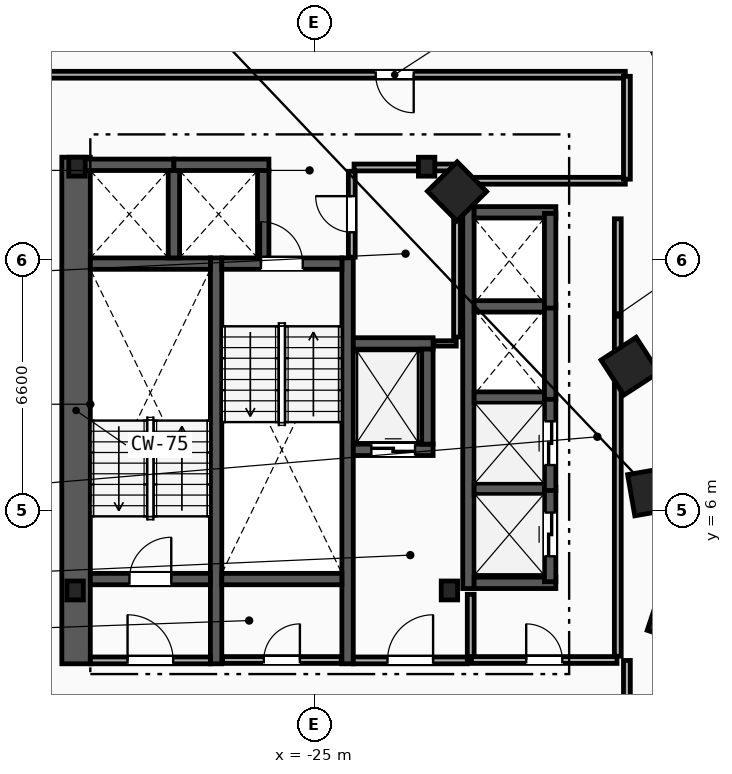
"""IFC4 building model, lengths in metres.
Left out: names, types, materials, properties, quantities, classifications, styles, units other than length and angle.
Written with IfcOpenShell. Run it as: python <this file> out.ifc"""

import sys

from ifc_helpers import new_model, si_unit, direction, frame, frame_2d, origin, origin_2d, place, context, subcontext, project, spatial, rectangle, i_section, extrude, element, fill, save


model = new_model("IFC4")
c1 = context("Model", 3, precision=1e-05, world=origin(), true_north=direction((0.0, 1.0)))
c2 = subcontext(c1, "Body", "Model", "MODEL_VIEW")
j1 = project(units=[si_unit("LENGTHUNIT", "METRE"), si_unit("PLANEANGLEUNIT", "RADIAN")], contexts=[c1])
p1 = place(None, origin())
s1 = spatial("IfcSite", under=j1, at=p1, CompositionType="ELEMENT")
p2 = place(p1, origin())
s2 = spatial("IfcBuilding", under=s1, at=p2, CompositionType="ELEMENT")
p3 = place(p2, frame((0.0, 0.0, 110.6)))
s3 = spatial("IfcBuildingStorey", under=s2, at=p3, CompositionType="ELEMENT", Elevation=110.6)
for number, where, z_axis, x_axis in (
    (1, (-31.3, 3.9, 0.0), (0.0, 0.0, 1.0), (1.0, 0.0, 0.0)),
    (2, (-21.45, 3.9, 0.0), (0.0, 0.0, 1.0), (1.0, 0.0, 0.0)),
    (3, (-22.05, 15.05, 0.0), (0.0, 0.0, 1.0), (1.0, 0.0, 0.0)),
    (4, (-31.25, 15.05, 0.0), (0.0, 0.0, 1.0), (1.0, 0.0, 0.0)),
):
    element("IfcColumn", number, at=place(p3, frame(where, z_axis=z_axis, x_axis=x_axis)), inside=s3, PredefinedType="COLUMN", context=c2, shape_type="SweptSolid", body=[
        extrude(i_section(OverallWidth=0.432, OverallDepth=0.498, WebThickness=0.056, FlangeThickness=0.089, FilletRadius=0.018, at=origin_2d()), origin(), (0.0, 0.0, 1.0), 3.6),
    ])
for number, where, z_axis, x_axis in (
    (5, (-15.55, 3.2, 0.0), (0.0, 0.0, 1.0), (0.315, 0.949, 0.0)),
    (6, (-16.125, 6.5, 0.0), (0.0, 0.0, 1.0), (-0.172, 0.985, 0.0)),
    (7, (-16.7, 9.8, 0.0), (0.0, 0.0, 1.0), (-0.544, 0.839, 0.0)),
    (8, (-21.25, 14.4, 0.0), (0.0, 0.0, 1.0), (-0.703, 0.711, 0.0)),
):
    element("IfcColumn", number, at=place(p3, frame(where, z_axis=z_axis, x_axis=x_axis)), inside=s3, PredefinedType="COLUMN", context=c2, shape_type="SweptSolid", body=[
        extrude(rectangle(XDim=1.1, YDim=1.1, at=origin_2d()), origin(), (0.0, 0.0, 1.0), 3.6),
    ])
p4 = place(p3, frame((-31.275, 1.97, 0.0), z_axis=(0.0, 0.0, 1.0), x_axis=(0.0, 1.0, 0.0)))
e9 = element("IfcWall", 9, at=p4, inside=s3, PredefinedType="SHEAR", context=c2, shape_type="SweptSolid", body=[
    extrude(rectangle(XDim=13.33, YDim=0.75, at=frame_2d((6.665, 0.0))), origin(), (0.0, 0.0, 1.0), 3.3),
])
for number, where, z_axis, x_axis in (
    (10, (-27.59, 1.97, 0.0), (0.0, 0.0, 1.0), (0.0, 1.0, 0.0)),
    (11, (-24.13, 1.97, 0.0), (0.0, 0.0, 1.0), (0.0, 1.0, 0.0)),
):
    element("IfcWall", number, at=place(p3, frame(where, z_axis=z_axis, x_axis=x_axis)), inside=s3, PredefinedType="SHEAR", context=c2, shape_type="SweptSolid", body=[
        extrude(rectangle(XDim=10.68, YDim=0.3, at=frame_2d((5.34, 0.0))), origin(), (0.0, 0.0, 1.0), 3.3),
    ])
p5 = place(p3, frame((-30.9, 4.2, 0.0), z_axis=(0.0, 0.0, 1.0), x_axis=(1.0, 0.0, 0.0)))
e12 = element("IfcWall", 12, at=p5, inside=s3, PredefinedType="SHEAR", context=c2, shape_type="SweptSolid", body=[
    extrude(rectangle(XDim=3.16, YDim=0.3, at=frame_2d((1.58, 0.0))), origin(), (0.0, 0.0, 1.0), 3.3),
])
p6 = place(p5, frame((1.03, 0.0, 0.0)))
e13 = element("IfcOpeningElement", 13, at=p6, cuts=e12, PredefinedType="OPENING", context=c2, shape_type="SweptSolid", body=[
    extrude(rectangle(XDim=1.1, YDim=2.15, at=frame_2d((0.55, 1.075))), frame((0.0, 0.16, 0.0), z_axis=(0.0, -1.0, 0.0), x_axis=(1.0, 0.0, 0.0)), (0.0, 0.0, 1.0), 0.32),
])
p7 = place(p3, frame((-30.9, 12.5, 0.0), z_axis=(0.0, 0.0, 1.0), x_axis=(1.0, 0.0, 0.0)))
e14 = element("IfcWall", 14, at=p7, inside=s3, PredefinedType="SHEAR", context=c2, shape_type="SweptSolid", body=[
    extrude(rectangle(XDim=3.16, YDim=0.3, at=frame_2d((1.58, 0.0))), origin(), (0.0, 0.0, 1.0), 3.3),
])
p8 = place(p3, frame((-27.44, 12.5, 0.0), z_axis=(0.0, 0.0, 1.0), x_axis=(1.0, 0.0, 0.0)))
e15 = element("IfcWall", 15, at=p8, inside=s3, PredefinedType="SHEAR", context=c2, shape_type="SweptSolid", body=[
    extrude(rectangle(XDim=3.16, YDim=0.3, at=frame_2d((1.58, 0.0))), origin(), (0.0, 0.0, 1.0), 3.3),
])
p9 = place(p8, frame((1.03, 0.0, 0.0)))
e16 = element("IfcOpeningElement", 16, at=p9, cuts=e15, PredefinedType="OPENING", context=c2, shape_type="SweptSolid", body=[
    extrude(rectangle(XDim=1.1, YDim=2.15, at=frame_2d((0.55, 1.075))), frame((0.0, 0.16, 0.0), z_axis=(0.0, -1.0, 0.0), x_axis=(1.0, 0.0, 0.0)), (0.0, 0.0, 1.0), 0.32),
])
p10 = place(p3, frame((-27.44, 4.2, 0.0), z_axis=(0.0, 0.0, 1.0), x_axis=(1.0, 0.0, 0.0)))
e17 = element("IfcWall", 17, at=p10, inside=s3, PredefinedType="SHEAR", context=c2, shape_type="SweptSolid", body=[
    extrude(rectangle(XDim=3.16, YDim=0.3, at=frame_2d((1.58, 0.0))), origin(), (0.0, 0.0, 1.0), 3.3),
])
p11 = place(p3, frame((-20.89, 2.15, 0.0), z_axis=(0.0, 0.0, 1.0), x_axis=(0.0, 1.0, 0.0)))
e18 = element("IfcWall", 18, at=p11, inside=s3, PredefinedType="PARTITIONING", context=c2, shape_type="SweptSolid", body=[
    extrude(rectangle(XDim=1.65, YDim=0.18, at=frame_2d((0.825, 0.0))), origin(), (0.0, 0.0, 1.0), 3.3),
])
p12 = place(p3, frame((-23.98, 2.06, 0.0), z_axis=(0.0, 0.0, 1.0), x_axis=(1.0, 0.0, 0.0)))
e19 = element("IfcWall", 19, at=p12, inside=s3, PredefinedType="PARTITIONING", context=c2, shape_type="SweptSolid", body=[
    extrude(rectangle(XDim=3.0, YDim=0.18, at=frame_2d((1.5, 0.0))), origin(), (0.0, 0.0, 1.0), 3.3),
])
p13 = place(p12, frame((0.9, 0.0, 0.0)))
e20 = element("IfcOpeningElement", 20, at=p13, cuts=e19, PredefinedType="OPENING", context=c2, shape_type="SweptSolid", body=[
    extrude(rectangle(XDim=1.2, YDim=2.15, at=frame_2d((0.6, 1.075))), frame((0.0, 0.1, 0.0), z_axis=(0.0, -1.0, 0.0), x_axis=(1.0, 0.0, 0.0)), (0.0, 0.0, 1.0), 0.2),
])
p14 = place(p3, frame((-30.9, 2.06, 0.0), z_axis=(0.0, 0.0, 1.0), x_axis=(1.0, 0.0, 0.0)))
e21 = element("IfcWall", 21, at=p14, inside=s3, PredefinedType="PARTITIONING", context=c2, shape_type="SweptSolid", body=[
    extrude(rectangle(XDim=3.16, YDim=0.18, at=frame_2d((1.58, 0.0))), origin(), (0.0, 0.0, 1.0), 3.3),
])
p15 = place(p14, frame((0.98, 0.0, 0.0)))
e22 = element("IfcOpeningElement", 22, at=p15, cuts=e21, PredefinedType="OPENING", context=c2, shape_type="SweptSolid", body=[
    extrude(rectangle(XDim=1.2, YDim=2.15, at=frame_2d((0.6, 1.075))), frame((0.0, 0.1, 0.0), z_axis=(0.0, -1.0, 0.0), x_axis=(1.0, 0.0, 0.0)), (0.0, 0.0, 1.0), 0.2),
])
p16 = place(p3, frame((-23.98, 7.6, 0.0), z_axis=(0.0, 0.0, 1.0), x_axis=(1.0, 0.0, 0.0)))
e23 = element("IfcWall", 23, at=p16, inside=s3, PredefinedType="SHEAR", context=c2, shape_type="SweptSolid", body=[
    extrude(rectangle(XDim=2.1, YDim=0.3, at=frame_2d((1.05, 0.0))), origin(), (0.0, 0.0, 1.0), 3.3),
])
p17 = place(p16, frame((0.475, 0.0, 0.0)))
e24 = element("IfcOpeningElement", 24, at=p17, cuts=e23, PredefinedType="OPENING", context=c2, shape_type="SweptSolid", body=[
    extrude(rectangle(XDim=1.15, YDim=2.2, at=frame_2d((0.575, 1.1))), frame((0.0, 0.16, 0.0), z_axis=(0.0, -1.0, 0.0), x_axis=(1.0, 0.0, 0.0)), (0.0, 0.0, 1.0), 0.32),
])
p18 = place(p3, frame((-23.98, 10.4, 0.0), z_axis=(0.0, 0.0, 1.0), x_axis=(1.0, 0.0, 0.0)))
e25 = element("IfcWall", 25, at=p18, inside=s3, PredefinedType="SHEAR", context=c2, shape_type="SweptSolid", body=[
    extrude(rectangle(XDim=2.1, YDim=0.3, at=frame_2d((1.05, 0.0))), origin(), (0.0, 0.0, 1.0), 3.3),
])
for number, where, z_axis, x_axis in (
    (26, (-22.03, 7.75, 0.0), (0.0, 0.0, 1.0), (0.0, 1.0, 0.0)),
    (27, (-31.2, 15.1, 0.0), (0.0, 0.0, 1.0), (1.0, 0.0, 0.0)),
):
    element("IfcWall", number, at=place(p3, frame(where, z_axis=z_axis, x_axis=x_axis)), inside=s3, PredefinedType="SHEAR", context=c2, shape_type="SweptSolid", body=[
        extrude(rectangle(XDim=2.5, YDim=0.3, at=frame_2d((1.25, 0.0))), origin(), (0.0, 0.0, 1.0), 3.3),
    ])
p19 = place(p3, frame((-28.7, 12.65, 0.0), z_axis=(0.0, 0.0, 1.0), x_axis=(0.0, 1.0, 0.0)))
e28 = element("IfcWall", 28, at=p19, inside=s3, PredefinedType="SHEAR", context=c2, shape_type="SweptSolid", body=[
    extrude(rectangle(XDim=2.3, YDim=0.3, at=frame_2d((1.15, 0.0))), origin(), (0.0, 0.0, 1.0), 3.3),
])
p20 = place(p3, frame((-28.7, 15.1, 0.0), z_axis=(0.0, 0.0, 1.0), x_axis=(1.0, 0.0, 0.0)))
e29 = element("IfcWall", 29, at=p20, inside=s3, PredefinedType="SHEAR", context=c2, shape_type="SweptSolid", body=[
    extrude(rectangle(XDim=2.5, YDim=0.3, at=frame_2d((1.25, 0.0))), origin(), (0.0, 0.0, 1.0), 3.3),
])
p21 = place(p3, frame((-26.35, 12.65, 0.0), z_axis=(0.0, 0.0, 1.0), x_axis=(0.0, 1.0, 0.0)))
e30 = element("IfcWall", 30, at=p21, inside=s3, PredefinedType="SHEAR", context=c2, shape_type="SweptSolid", body=[
    extrude(rectangle(XDim=2.3, YDim=0.3, at=frame_2d((1.15, 0.0))), origin(), (0.0, 0.0, 1.0), 3.3),
])
p22 = place(p3, frame((-20.95, 3.95, 0.0), z_axis=(0.0, 0.0, 1.0), x_axis=(0.0, 1.0, 0.0)))
e31 = element("IfcWall", 31, at=p22, inside=s3, PredefinedType="SHEAR", context=c2, shape_type="SweptSolid", body=[
    extrude(rectangle(XDim=10.05, YDim=0.3, at=frame_2d((5.025, 0.0))), origin(), (0.0, 0.0, 1.0), 3.3),
])
for number, where, z_axis, x_axis in (
    (32, (-20.8, 4.1, 0.0), (0.0, 0.0, 1.0), (1.0, 0.0, 0.0)),
    (33, (-20.8, 13.85, 0.0), (0.0, 0.0, 1.0), (1.0, 0.0, 0.0)),
):
    element("IfcWall", number, at=place(p3, frame(where, z_axis=z_axis, x_axis=x_axis)), inside=s3, PredefinedType="SHEAR", context=c2, shape_type="SweptSolid", body=[
        extrude(rectangle(XDim=2.15, YDim=0.3, at=frame_2d((1.075, 0.0))), origin(), (0.0, 0.0, 1.0), 3.3),
    ])
for number, where, z_axis, x_axis in (
    (34, (-20.8, 6.575, 0.0), (0.0, 0.0, 1.0), (1.0, 0.0, 0.0)),
    (35, (-20.8, 8.975, 0.0), (0.0, 0.0, 1.0), (1.0, 0.0, 0.0)),
    (36, (-20.8, 11.375, 0.0), (0.0, 0.0, 1.0), (1.0, 0.0, 0.0)),
):
    element("IfcWall", number, at=place(p3, frame(where, z_axis=z_axis, x_axis=x_axis)), inside=s3, PredefinedType="SHEAR", context=c2, shape_type="SweptSolid", body=[
        extrude(rectangle(XDim=1.85, YDim=0.3, at=frame_2d((0.925, 0.0))), origin(), (0.0, 0.0, 1.0), 3.3),
    ])
p23 = place(p3, frame((-18.8, 4.13, 0.0), z_axis=(0.0, 0.0, 1.0), x_axis=(0.0, 1.0, 0.0)))
e37 = element("IfcWall", 37, at=p23, inside=s3, PredefinedType="SHEAR", context=c2, shape_type="SweptSolid", body=[
    extrude(rectangle(XDim=2.49, YDim=0.3, at=frame_2d((1.245, 0.0))), origin(), (0.0, 0.0, 1.0), 3.3),
])
p24 = place(p23, frame((0.67, 0.0, 0.0)))
e38 = element("IfcOpeningElement", 38, at=p24, cuts=e37, PredefinedType="OPENING", context=c2, shape_type="SweptSolid", body=[
    extrude(rectangle(XDim=1.15, YDim=2.2, at=frame_2d((0.575, 1.1))), frame((0.0, 0.16, 0.0), z_axis=(0.0, -1.0, 0.0), x_axis=(1.0, 0.0, 0.0)), (0.0, 0.0, 1.0), 0.32),
])
p25 = place(p3, frame((-18.8, 6.53, 0.0), z_axis=(0.0, 0.0, 1.0), x_axis=(0.0, 1.0, 0.0)))
e39 = element("IfcWall", 39, at=p25, inside=s3, PredefinedType="SHEAR", context=c2, shape_type="SweptSolid", body=[
    extrude(rectangle(XDim=2.49, YDim=0.3, at=frame_2d((1.245, 0.0))), origin(), (0.0, 0.0, 1.0), 3.3),
])
p26 = place(p25, frame((0.67, 0.0, 0.0)))
e40 = element("IfcOpeningElement", 40, at=p26, cuts=e39, PredefinedType="OPENING", context=c2, shape_type="SweptSolid", body=[
    extrude(rectangle(XDim=1.15, YDim=2.2, at=frame_2d((0.575, 1.1))), frame((0.0, 0.16, 0.0), z_axis=(0.0, -1.0, 0.0), x_axis=(1.0, 0.0, 0.0)), (0.0, 0.0, 1.0), 0.32),
])
for number, where, z_axis, x_axis in (
    (41, (-18.8, 8.93, 0.0), (0.0, 0.0, 1.0), (0.0, 1.0, 0.0)),
    (42, (-18.8, 11.33, 0.0), (0.0, 0.0, 1.0), (0.0, 1.0, 0.0)),
):
    element("IfcWall", number, at=place(p3, frame(where, z_axis=z_axis, x_axis=x_axis)), inside=s3, PredefinedType="SHEAR", context=c2, shape_type="SweptSolid", body=[
        extrude(rectangle(XDim=2.49, YDim=0.3, at=frame_2d((1.245, 0.0))), origin(), (0.0, 0.0, 1.0), 3.3),
    ])
p27 = place(p3, frame((-17.02, 2.17, 0.0), z_axis=(0.0, 0.0, 1.0), x_axis=(0.0, 1.0, 0.0)))
e43 = element("IfcWall", 43, at=p27, inside=s3, PredefinedType="PARTITIONING", context=c2, shape_type="SweptSolid", body=[
    extrude(rectangle(XDim=11.51, YDim=0.18, at=frame_2d((5.755, 0.0))), origin(), (0.0, 0.0, 1.0), 3.3),
])
p28 = place(p3, frame((-20.87, 2.07, 0.0), z_axis=(0.0, 0.0, 1.0), x_axis=(1.0, 0.0, 0.0)))
e44 = element("IfcWall", 44, at=p28, inside=s3, PredefinedType="PARTITIONING", context=c2, shape_type="SweptSolid", body=[
    extrude(rectangle(XDim=3.83, YDim=0.18, at=frame_2d((1.915, 0.0))), origin(), (0.0, 0.0, 1.0), 3.3),
])
p29 = place(p28, frame((1.44, 0.0, 0.0)))
e45 = element("IfcOpeningElement", 45, at=p29, cuts=e44, PredefinedType="OPENING", context=c2, shape_type="SweptSolid", body=[
    extrude(rectangle(XDim=0.95, YDim=2.1, at=frame_2d((0.475, 1.05))), frame((0.0, 0.1, 0.0), z_axis=(0.0, -1.0, 0.0), x_axis=(1.0, 0.0, 0.0)), (0.0, 0.0, 1.0), 0.2),
])
p30 = place(p3, frame((-21.86, 10.4, 0.0), z_axis=(0.0, 0.0, 1.0), x_axis=(1.0, 0.0, 0.0)))
e46 = element("IfcWall", 46, at=p30, inside=s3, PredefinedType="PARTITIONING", context=c2, shape_type="SweptSolid", body=[
    extrude(rectangle(XDim=0.59, YDim=0.14, at=frame_2d((0.295, 0.0))), origin(), (0.0, 0.0, 1.0), 3.3),
])
p31 = place(p3, frame((-21.25, 10.57, 0.0), z_axis=(0.0, 0.0, 1.0), x_axis=(0.0, 1.0, 0.0)))
e47 = element("IfcWall", 47, at=p31, inside=s3, PredefinedType="PARTITIONING", context=c2, shape_type="SweptSolid", body=[
    extrude(rectangle(XDim=4.36, YDim=0.18, at=frame_2d((2.18, 0.0))), origin(), (0.0, 0.0, 1.0), 3.3),
])
p32 = place(p3, frame((-23.96, 15.03, 0.0), z_axis=(0.0, 0.0, 1.0), x_axis=(1.0, 0.0, 0.0)))
e48 = element("IfcWall", 48, at=p32, inside=s3, PredefinedType="PARTITIONING", context=c2, shape_type="SweptSolid", body=[
    extrude(rectangle(XDim=2.61, YDim=0.18, at=frame_2d((1.305, 0.0))), origin(), (0.0, 0.0, 1.0), 2.373),
])
p33 = place(p3, frame((-27.42, 2.07, 0.0), z_axis=(0.0, 0.0, 1.0), x_axis=(1.0, 0.0, 0.0)))
e49 = element("IfcWall", 49, at=p33, inside=s3, PredefinedType="PARTITIONING", context=c2, shape_type="SweptSolid", body=[
    extrude(rectangle(XDim=3.12, YDim=0.18, at=frame_2d((1.56, 0.0))), origin(), (0.0, 0.0, 1.0), 3.3),
])
p34 = place(p33, frame((1.085, 0.0, 0.0)))
e50 = element("IfcOpeningElement", 50, at=p34, cuts=e49, PredefinedType="OPENING", context=c2, shape_type="SweptSolid", body=[
    extrude(rectangle(XDim=0.95, YDim=2.1, at=frame_2d((0.475, 1.05))), frame((0.0, 0.1, 0.0), z_axis=(0.0, -1.0, 0.0), x_axis=(1.0, 0.0, 0.0)), (0.0, 0.0, 1.0), 0.2),
])
p35 = place(p3, frame((-24.02, 12.67, 0.0), z_axis=(0.0, 0.0, 1.0), x_axis=(0.0, 1.0, 0.0)))
e51 = element("IfcWall", 51, at=p35, inside=s3, PredefinedType="PARTITIONING", context=c2, shape_type="SweptSolid", body=[
    extrude(rectangle(XDim=2.26, YDim=0.18, at=frame_2d((1.13, 0.0))), origin(), (0.0, 0.0, 1.0), 3.3),
])
p36 = place(p35, frame((0.655, 0.0, 0.0)))
e52 = element("IfcOpeningElement", 52, at=p36, cuts=e51, PredefinedType="OPENING", context=c2, shape_type="SweptSolid", body=[
    extrude(rectangle(XDim=0.95, YDim=2.1, at=frame_2d((0.475, 1.05))), frame((0.0, 0.1, 0.0), z_axis=(0.0, -1.0, 0.0), x_axis=(1.0, 0.0, 0.0)), (0.0, 0.0, 1.0), 0.2),
])
p37 = place(p3, frame((-16.822, 17.47, 0.0), z_axis=(0.0, 0.0, 1.0), x_axis=(-1.0, 0.0, 0.0)))
e53 = element("IfcWall", 53, at=p37, inside=s3, PredefinedType="PARTITIONING", context=c2, shape_type="SweptSolid", body=[
    extrude(rectangle(XDim=16.807, YDim=0.18, at=frame_2d((8.403, 0.0))), origin(), (0.0, 0.0, 1.0), 3.3),
])
p38 = place(p37, frame((5.569, 0.0, 0.0)))
e54 = element("IfcOpeningElement", 54, at=p38, cuts=e53, PredefinedType="OPENING", context=c2, shape_type="SweptSolid", body=[
    extrude(rectangle(XDim=1.0, YDim=2.15, at=frame_2d((0.5, 1.075))), frame((0.0, 0.1, 0.0), z_axis=(0.0, -1.0, 0.0), x_axis=(1.0, 0.0, 0.0)), (0.0, 0.0, 1.0), 0.2),
])
p39 = place(p3, frame((-21.178, 14.68, 0.0), z_axis=(0.0, 0.0, 1.0), x_axis=(1.0, 0.0, 0.0)))
e55 = element("IfcWall", 55, at=p39, inside=s3, PredefinedType="PARTITIONING", context=c2, shape_type="SweptSolid", body=[
    extrude(rectangle(XDim=4.357, YDim=0.18, at=frame_2d((2.178, 0.0))), origin(), (0.0, 0.0, 1.0), 3.3),
])
p40 = place(p3, frame((-16.78, 14.721, 0.0), z_axis=(0.0, 0.0, 1.0), x_axis=(0.0, 1.0, 0.0)))
e56 = element("IfcWall", 56, at=p40, inside=s3, PredefinedType="PARTITIONING", context=c2, shape_type="SweptSolid", body=[
    extrude(rectangle(XDim=2.707, YDim=0.18, at=frame_2d((1.354, 0.0))), origin(), (0.0, 0.0, 1.0), 3.3),
])
p41 = place(p3, frame((-16.78, -0.329, 0.0), z_axis=(0.0, 0.0, 1.0), x_axis=(0.0, 1.0, 0.0)))
e57 = element("IfcWall", 57, at=p41, inside=s3, PredefinedType="PARTITIONING", context=c2, shape_type="SweptSolid", body=[
    extrude(rectangle(XDim=2.387, YDim=0.18, at=frame_2d((1.194, 0.0))), origin(), (0.0, 0.0, 1.0), 3.3),
])
p42 = place(p6, origin())
e58 = element("IfcDoor", 58, at=p42, inside=s3, OperationType="SINGLE_SWING_RIGHT", PredefinedType="DOOR", context=c2, shape_type="SweptSolid", body=[
    extrude(rectangle(XDim=1.1, YDim=2.15, at=frame_2d((0.55, 1.075))), frame((0.0, 0.025, 0.0), z_axis=(0.0, -1.0, 0.0), x_axis=(1.0, 0.0, 0.0)), (0.0, 0.0, 1.0), 0.05),
])
fill(e13, e58)
p43 = place(p9, origin())
e59 = element("IfcDoor", 59, at=p43, inside=s3, OperationType="SINGLE_SWING_LEFT", PredefinedType="DOOR", context=c2, shape_type="SweptSolid", body=[
    extrude(rectangle(XDim=1.1, YDim=2.15, at=frame_2d((0.55, 1.075))), frame((0.0, 0.025, 0.0), z_axis=(0.0, -1.0, 0.0), x_axis=(1.0, 0.0, 0.0)), (0.0, 0.0, 1.0), 0.05),
])
fill(e16, e59)
p44 = place(p13, origin())
e60 = element("IfcDoor", 60, at=p44, inside=s3, OperationType="SINGLE_SWING_RIGHT", PredefinedType="DOOR", context=c2, shape_type="SweptSolid", body=[
    extrude(rectangle(XDim=1.2, YDim=2.15, at=frame_2d((0.6, 1.075))), frame((0.0, 0.025, 0.0), z_axis=(0.0, -1.0, 0.0), x_axis=(1.0, 0.0, 0.0)), (0.0, 0.0, 1.0), 0.05),
])
fill(e20, e60)
p45 = place(p15, origin())
e61 = element("IfcDoor", 61, at=p45, inside=s3, OperationType="SINGLE_SWING_LEFT", PredefinedType="DOOR", context=c2, shape_type="SweptSolid", body=[
    extrude(rectangle(XDim=1.2, YDim=2.15, at=frame_2d((0.6, 1.075))), frame((0.0, 0.025, 0.0), z_axis=(0.0, -1.0, 0.0), x_axis=(1.0, 0.0, 0.0)), (0.0, 0.0, 1.0), 0.05),
])
fill(e22, e61)
p46 = place(p17, origin())
e62 = element("IfcDoor", 62, at=p46, inside=s3, OperationType="SLIDING_TO_LEFT", PredefinedType="TRAPDOOR", context=c2, shape_type="SweptSolid", body=[
    extrude(rectangle(XDim=1.15, YDim=2.2, at=frame_2d((0.575, 1.1))), frame((0.0, 0.025, 0.0), z_axis=(0.0, -1.0, 0.0), x_axis=(1.0, 0.0, 0.0)), (0.0, 0.0, 1.0), 0.05),
])
fill(e24, e62)
p47 = place(p24, origin())
e63 = element("IfcDoor", 63, at=p47, inside=s3, OperationType="SLIDING_TO_LEFT", PredefinedType="TRAPDOOR", context=c2, shape_type="SweptSolid", body=[
    extrude(rectangle(XDim=1.15, YDim=2.2, at=frame_2d((0.575, 1.1))), frame((0.0, 0.025, 0.0), z_axis=(0.0, -1.0, 0.0), x_axis=(1.0, 0.0, 0.0)), (0.0, 0.0, 1.0), 0.05),
])
fill(e38, e63)
p48 = place(p26, origin())
e64 = element("IfcDoor", 64, at=p48, inside=s3, OperationType="SLIDING_TO_LEFT", PredefinedType="TRAPDOOR", context=c2, shape_type="SweptSolid", body=[
    extrude(rectangle(XDim=1.15, YDim=2.2, at=frame_2d((0.575, 1.1))), frame((0.0, 0.025, 0.0), z_axis=(0.0, -1.0, 0.0), x_axis=(1.0, 0.0, 0.0)), (0.0, 0.0, 1.0), 0.05),
])
fill(e40, e64)
p49 = place(p38, origin())
e65 = element("IfcDoor", 65, at=p49, inside=s3, OperationType="SINGLE_SWING_LEFT", PredefinedType="DOOR", context=c2, shape_type="SweptSolid", body=[
    extrude(rectangle(XDim=1.0, YDim=2.15, at=frame_2d((0.5, 1.075))), frame((0.0, 0.025, 0.0), z_axis=(0.0, -1.0, 0.0), x_axis=(1.0, 0.0, 0.0)), (0.0, 0.0, 1.0), 0.05),
])
fill(e54, e65)
p50 = place(p29, origin())
e66 = element("IfcDoor", 66, at=p50, inside=s3, OperationType="SINGLE_SWING_LEFT", PredefinedType="DOOR", context=c2, shape_type="SweptSolid", body=[
    extrude(rectangle(XDim=0.95, YDim=2.1, at=frame_2d((0.475, 1.05))), frame((0.0, 0.025, 0.0), z_axis=(0.0, -1.0, 0.0), x_axis=(1.0, 0.0, 0.0)), (0.0, 0.0, 1.0), 0.05),
])
fill(e45, e66)
p51 = place(p34, origin())
e67 = element("IfcDoor", 67, at=p51, inside=s3, OperationType="SINGLE_SWING_RIGHT", PredefinedType="DOOR", context=c2, shape_type="SweptSolid", body=[
    extrude(rectangle(XDim=0.95, YDim=2.1, at=frame_2d((0.475, 1.05))), frame((0.0, 0.025, 0.0), z_axis=(0.0, -1.0, 0.0), x_axis=(1.0, 0.0, 0.0)), (0.0, 0.0, 1.0), 0.05),
])
fill(e50, e67)
p52 = place(p36, origin())
e68 = element("IfcDoor", 68, at=p52, inside=s3, OperationType="SINGLE_SWING_RIGHT", PredefinedType="DOOR", context=c2, shape_type="SweptSolid", body=[
    extrude(rectangle(XDim=0.95, YDim=2.1, at=frame_2d((0.475, 1.05))), frame((0.0, 0.025, 0.0), z_axis=(0.0, -1.0, 0.0), x_axis=(1.0, 0.0, 0.0)), (0.0, 0.0, 1.0), 0.05),
])
fill(e52, e68)
save(model, sys.argv[1])
